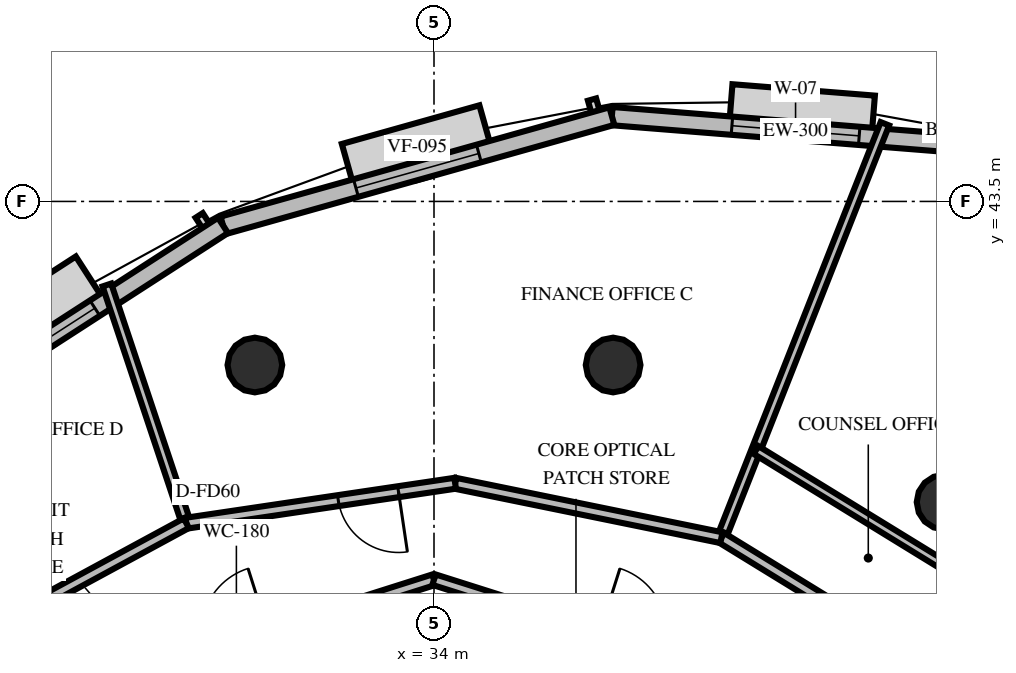
"""IFC4 building model, lengths in metres.
Left out: names, types, materials, properties, quantities, classifications, styles, units other than length and angle.
Written with IfcOpenShell. Run it as: python <this file> out.ifc"""

import sys

from ifc_helpers import new_model, si_unit, direction, frame, frame_2d, origin, origin_2d, place, context, subcontext, project, spatial, rectangle, circle, extrude, element, fill, save


model = new_model("IFC4")
c1 = context("Model", 3, precision=1e-05, world=origin(), true_north=direction((0.0, 1.0)))
c2 = subcontext(c1, "Body", "Model", "MODEL_VIEW")
j1 = project(units=[si_unit("LENGTHUNIT", "METRE"), si_unit("PLANEANGLEUNIT", "RADIAN")], contexts=[c1])
p1 = place(None, origin())
s1 = spatial("IfcSite", under=j1, at=p1, CompositionType="ELEMENT")
p2 = place(p1, origin())
s2 = spatial("IfcBuilding", under=s1, at=p2, CompositionType="ELEMENT")
p3 = place(p2, frame((0.0, 0.0, 234.0)))
s3 = spatial("IfcBuildingStorey", under=s2, at=p3, CompositionType="ELEMENT", Elevation=234.0)
for number, where, z_axis, x_axis in (
    (1, (42.389, 38.555, 0.0), (0.0, 0.0, 1.0), (1.0, 0.0, 0.0)),
    (2, (36.946, 40.81, 0.0), (0.0, 0.0, 1.0), (1.0, 0.0, 0.0)),
    (3, (31.054, 40.81, 0.0), (0.0, 0.0, 1.0), (1.0, 0.0, 0.0)),
):
    element("IfcColumn", number, at=place(p3, frame(where, z_axis=z_axis, x_axis=x_axis)), inside=s3, PredefinedType="COLUMN", context=c2, shape_type="SweptSolid", body=[
        extrude(circle(Radius=0.45, at=origin_2d()), origin(), (0.0, 0.0, 1.0), 3.6),
    ])
p4 = place(p3, frame((42.968, 44.42, 0.0), z_axis=(0.0, 0.0, 1.0), x_axis=(-0.996821678443, 0.079665183029, 0.0)))
e4 = element("IfcWall", 4, at=p4, inside=s3, PredefinedType="SOLIDWALL", context=c2, shape_type="SweptSolid", body=[
    extrude(rectangle(XDim=6.062, YDim=0.3, at=frame_2d((3.031, 0.0))), origin(), (0.0, 0.0, 1.0), 2.76),
])
p5 = place(p4, frame((1.981, 0.0, 0.8)))
e5 = element("IfcOpeningElement", 5, at=p5, cuts=e4, PredefinedType="OPENING", context=c2, shape_type="SweptSolid", body=[
    extrude(rectangle(XDim=2.1, YDim=1.85, at=frame_2d((1.05, 0.925))), frame((0.0, 0.16, 0.0), z_axis=(0.0, -1.0, 0.0), x_axis=(1.0, 0.0, 0.0)), (0.0, 0.0, 1.0), 0.32),
])
p6 = place(p3, frame((36.925, 44.903, 0.0), z_axis=(0.0, 0.0, 1.0), x_axis=(-0.962704799022, -0.270554005589, 0.0)))
e6 = element("IfcWall", 6, at=p6, inside=s3, PredefinedType="SOLIDWALL", context=c2, shape_type="SweptSolid", body=[
    extrude(rectangle(XDim=6.643, YDim=0.3, at=frame_2d((3.322, 0.0))), origin(), (0.0, 0.0, 1.0), 2.76),
])
p7 = place(p6, frame((2.272, 0.0, 0.8)))
e7 = element("IfcOpeningElement", 7, at=p7, cuts=e6, PredefinedType="OPENING", context=c2, shape_type="SweptSolid", body=[
    extrude(rectangle(XDim=2.1, YDim=1.85, at=frame_2d((1.05, 0.925))), frame((0.0, 0.16, 0.0), z_axis=(0.0, -1.0, 0.0), x_axis=(1.0, 0.0, 0.0)), (0.0, 0.0, 1.0), 0.32),
])
p8 = place(p3, frame((30.53, 43.106, 0.0), z_axis=(0.0, 0.0, 1.0), x_axis=(-0.840018200764, -0.542558220272, 0.0)))
e8 = element("IfcWall", 8, at=p8, inside=s3, PredefinedType="SOLIDWALL", context=c2, shape_type="SweptSolid", body=[
    extrude(rectangle(XDim=7.115, YDim=0.3, at=frame_2d((3.558, 0.0))), origin(), (0.0, 0.0, 1.0), 2.76),
])
p9 = place(p8, frame((2.508, 0.0, 0.8)))
e9 = element("IfcOpeningElement", 9, at=p9, cuts=e8, PredefinedType="OPENING", context=c2, shape_type="SweptSolid", body=[
    extrude(rectangle(XDim=2.1, YDim=1.85, at=frame_2d((1.05, 0.925))), frame((0.0, 0.16, 0.0), z_axis=(0.0, -1.0, 0.0), x_axis=(1.0, 0.0, 0.0)), (0.0, 0.0, 1.0), 0.32),
])
p10 = place(p3, frame((27.5, 35.219, 0.0), z_axis=(0.0, 0.0, 1.0), x_axis=(0.953228121756, 0.302251795518, 0.0)))
e10 = element("IfcWall", 10, at=p10, inside=s3, PredefinedType="PARTITIONING", context=c2, shape_type="SweptSolid", body=[
    extrude(rectangle(XDim=6.819, YDim=0.18, at=frame_2d((3.409, 0.0))), origin(), (0.0, 0.0, 1.0), 2.46),
])
p11 = place(p10, frame((2.86, 0.0, 0.0)))
e11 = element("IfcOpeningElement", 11, at=p11, cuts=e10, PredefinedType="OPENING", context=c2, shape_type="SweptSolid", body=[
    extrude(rectangle(XDim=1.1, YDim=2.15, at=frame_2d((0.55, 1.075))), frame((0.0, 0.1, 0.0), z_axis=(0.0, -1.0, 0.0), x_axis=(1.0, 0.0, 0.0)), (0.0, 0.0, 1.0), 0.2),
])
p12 = place(p3, frame((34.0, 37.28, 0.0), z_axis=(0.0, 0.0, 1.0), x_axis=(0.953228121756, -0.302251795518, 0.0)))
e12 = element("IfcWall", 12, at=p12, inside=s3, PredefinedType="PARTITIONING", context=c2, shape_type="SweptSolid", body=[
    extrude(rectangle(XDim=6.819, YDim=0.18, at=frame_2d((3.409, 0.0))), origin(), (0.0, 0.0, 1.0), 2.46),
])
p13 = place(p12, frame((2.86, 0.0, 0.0)))
e13 = element("IfcOpeningElement", 13, at=p13, cuts=e12, PredefinedType="OPENING", context=c2, shape_type="SweptSolid", body=[
    extrude(rectangle(XDim=1.1, YDim=2.15, at=frame_2d((0.55, 1.075))), frame((0.0, 0.1, 0.0), z_axis=(0.0, -1.0, 0.0), x_axis=(1.0, 0.0, 0.0)), (0.0, 0.0, 1.0), 0.2),
])
p14 = place(p3, frame((38.727, 37.97, 0.0), z_axis=(0.0, 0.0, 1.0), x_axis=(0.367303252397, 0.93010124222, 0.0)))
e14 = element("IfcWall", 14, at=p14, inside=s3, PredefinedType="PARTITIONING", context=c2, shape_type="SweptSolid", body=[
    extrude(rectangle(XDim=7.318, YDim=0.15, at=frame_2d((3.659, 0.0))), origin(), (0.0, 0.0, 1.0), 2.46),
])
p15 = place(p3, frame((42.536, 35.632, 0.0), z_axis=(0.0, 0.0, 1.0), x_axis=(-0.852175498572, 0.523256074626, 0.0)))
e15 = element("IfcWall", 15, at=p15, inside=s3, PredefinedType="PARTITIONING", context=c2, shape_type="SweptSolid", body=[
    extrude(rectangle(XDim=4.47, YDim=0.18, at=frame_2d((2.235, 0.0))), origin(), (0.0, 0.0, 1.0), 2.46),
])
p16 = place(p3, frame((43.564, 36.792, 0.0), z_axis=(0.0, 0.0, 1.0), x_axis=(-0.852170081645, 0.523264896538, 0.0)))
e16 = element("IfcWall", 16, at=p16, inside=s3, PredefinedType="PARTITIONING", context=c2, shape_type="SweptSolid", body=[
    extrude(rectangle(XDim=5.008, YDim=0.15, at=frame_2d((2.504, 0.0))), origin(), (0.0, 0.0, 1.0), 2.46),
])
p17 = place(p3, frame((29.927, 38.208, 0.0), z_axis=(0.0, 0.0, 1.0), x_axis=(-0.316458316632, 0.948606416716, 0.0)))
e17 = element("IfcWall", 17, at=p17, inside=s3, PredefinedType="PARTITIONING", context=c2, shape_type="SweptSolid", body=[
    extrude(rectangle(XDim=4.13, YDim=0.15, at=frame_2d((2.065, 0.0))), origin(), (0.0, 0.0, 1.0), 2.46),
])
p18 = place(p3, frame((38.727, 37.97, 0.0), z_axis=(0.0, 0.0, 1.0), x_axis=(-0.979757075519, 0.200190092088, 0.0)))
e18 = element("IfcWall", 18, at=p18, inside=s3, PredefinedType="PARTITIONING", context=c2, shape_type="SweptSolid", body=[
    extrude(rectangle(XDim=4.47, YDim=0.18, at=frame_2d((2.235, 0.0))), origin(), (0.0, 0.0, 1.0), 2.46),
])
p19 = place(p3, frame((34.348, 38.865, 0.0), z_axis=(0.0, 0.0, 1.0), x_axis=(-0.989146493134, -0.146932689079, 0.0)))
e19 = element("IfcWall", 19, at=p19, inside=s3, PredefinedType="PARTITIONING", context=c2, shape_type="SweptSolid", body=[
    extrude(rectangle(XDim=4.47, YDim=0.18, at=frame_2d((2.235, 0.0))), origin(), (0.0, 0.0, 1.0), 2.46),
])
p20 = place(p19, frame((0.942, 0.0, 0.0)))
e20 = element("IfcOpeningElement", 20, at=p20, cuts=e19, PredefinedType="OPENING", context=c2, shape_type="SweptSolid", body=[
    extrude(rectangle(XDim=1.0, YDim=2.15, at=frame_2d((0.5, 1.075))), frame((0.0, 0.1, 0.0), z_axis=(0.0, -1.0, 0.0), x_axis=(1.0, 0.0, 0.0)), (0.0, 0.0, 1.0), 0.2),
])
p21 = place(p3, frame((29.927, 38.208, 0.0), z_axis=(0.0, 0.0, 1.0), x_axis=(-0.879228100165, -0.476401036817, 0.0)))
e21 = element("IfcWall", 21, at=p21, inside=s3, PredefinedType="PARTITIONING", context=c2, shape_type="SweptSolid", body=[
    extrude(rectangle(XDim=4.47, YDim=0.18, at=frame_2d((2.235, 0.0))), origin(), (0.0, 0.0, 1.0), 2.46),
])
p22 = place(p5, origin())
e22 = element("IfcWindow", 22, at=p22, inside=s3, PartitioningType="SINGLE_PANEL", PredefinedType="WINDOW", context=c2, shape_type="SweptSolid", body=[
    extrude(rectangle(XDim=2.1, YDim=1.85, at=frame_2d((1.05, 0.925))), frame((0.0, 0.03, 0.0), z_axis=(0.0, -1.0, 0.0), x_axis=(1.0, 0.0, 0.0)), (0.0, 0.0, 1.0), 0.06),
])
fill(e5, e22)
p23 = place(p7, origin())
e23 = element("IfcWindow", 23, at=p23, inside=s3, PartitioningType="SINGLE_PANEL", PredefinedType="WINDOW", context=c2, shape_type="SweptSolid", body=[
    extrude(rectangle(XDim=2.1, YDim=1.85, at=frame_2d((1.05, 0.925))), frame((0.0, 0.03, 0.0), z_axis=(0.0, -1.0, 0.0), x_axis=(1.0, 0.0, 0.0)), (0.0, 0.0, 1.0), 0.06),
])
fill(e7, e23)
p24 = place(p9, origin())
e24 = element("IfcWindow", 24, at=p24, inside=s3, PartitioningType="SINGLE_PANEL", PredefinedType="WINDOW", context=c2, shape_type="SweptSolid", body=[
    extrude(rectangle(XDim=2.1, YDim=1.85, at=frame_2d((1.05, 0.925))), frame((0.0, 0.03, 0.0), z_axis=(0.0, -1.0, 0.0), x_axis=(1.0, 0.0, 0.0)), (0.0, 0.0, 1.0), 0.06),
])
fill(e9, e24)
p25 = place(p20, origin())
e25 = element("IfcDoor", 25, at=p25, inside=s3, OperationType="SINGLE_SWING_LEFT", PredefinedType="DOOR", context=c2, shape_type="SweptSolid", body=[
    extrude(rectangle(XDim=1.0, YDim=2.15, at=frame_2d((0.5, 1.075))), frame((0.0, 0.025, 0.0), z_axis=(0.0, -1.0, 0.0), x_axis=(1.0, 0.0, 0.0)), (0.0, 0.0, 1.0), 0.05),
])
fill(e20, e25)
save(model, sys.argv[1])
